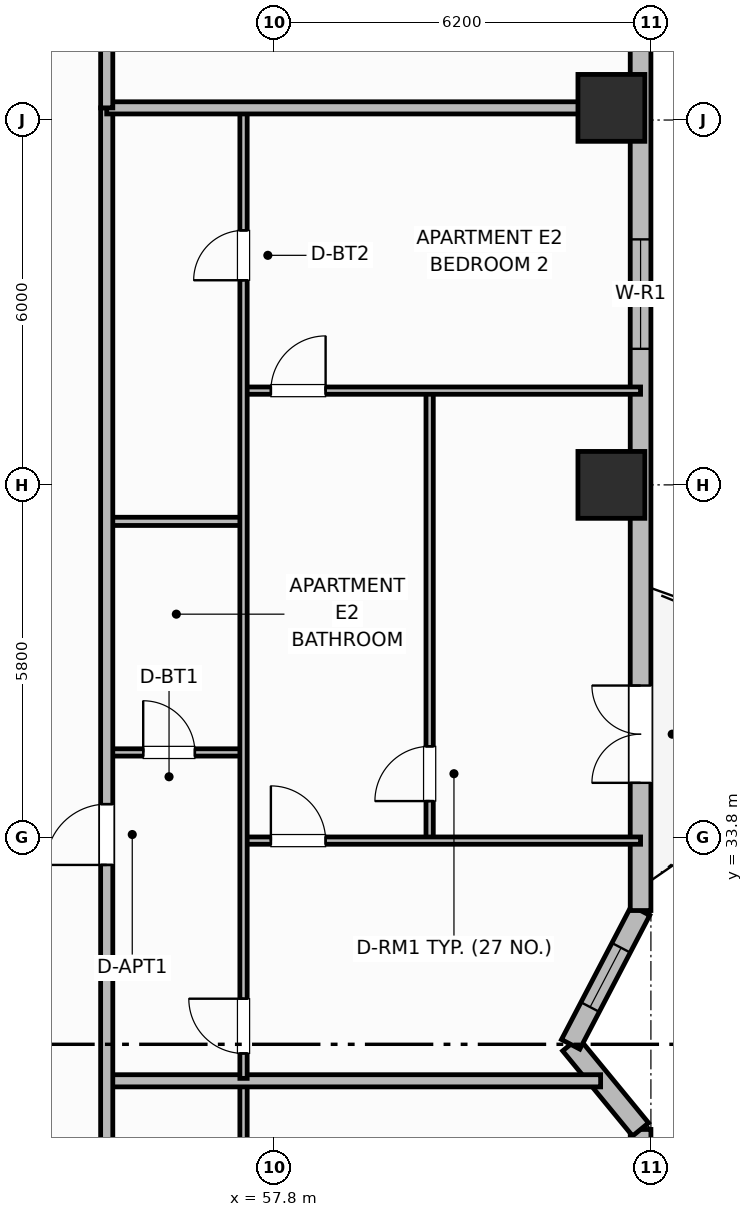
"""IFC4 building model, lengths in metres.
Left out: names, types, materials, properties, quantities, classifications, styles, units other than length and angle.
Written with IfcOpenShell. Run it as: python <this file> out.ifc"""

import sys

from ifc_helpers import new_model, si_unit, direction, frame, frame_2d, origin, origin_2d, place, context, subcontext, project, spatial, rectangle, extrude, element, fill, save


model = new_model("IFC4")
c1 = context("Model", 3, precision=1e-05, world=origin(), true_north=direction((0.0, 1.0)))
c2 = subcontext(c1, "Body", "Model", "MODEL_VIEW")
j1 = project(units=[si_unit("LENGTHUNIT", "METRE"), si_unit("PLANEANGLEUNIT", "RADIAN")], contexts=[c1])
p1 = place(None, origin())
s1 = spatial("IfcSite", under=j1, at=p1, CompositionType="ELEMENT")
p2 = place(p1, origin())
s2 = spatial("IfcBuilding", under=s1, at=p2, CompositionType="ELEMENT")
p3 = place(p2, frame((0.0, 0.0, 132.7)))
s3 = spatial("IfcBuildingStorey", under=s2, at=p3, CompositionType="ELEMENT", Elevation=132.7)
for number, where, z_axis, x_axis in (
    (1, (63.35, 39.6, 0.0), (0.0, 0.0, 1.0), (1.0, 0.0, 0.0)),
    (2, (63.35, 45.8, 0.0), (0.0, 0.0, 1.0), (1.0, 0.0, 0.0)),
):
    element("IfcColumn", number, at=place(p3, frame(where, z_axis=z_axis, x_axis=x_axis)), inside=s3, PredefinedType="COLUMN", context=c2, shape_type="SweptSolid", body=[
        extrude(rectangle(XDim=1.1, YDim=1.1, at=origin_2d()), origin(), (0.0, 0.0, 1.0), 3.7),
    ])
p4 = place(p3, frame((63.83, 27.4, 0.0), z_axis=(0.0, 0.0, 1.0), x_axis=(0.0, 1.0, 0.0)))
e3 = element("IfcWall", 3, at=p4, inside=s3, PredefinedType="SOLIDWALL", context=c2, shape_type="SweptSolid", body=[
    extrude(rectangle(XDim=1.6, YDim=0.34, at=frame_2d((0.8, 0.0))), origin(), (0.0, 0.0, 1.0), 2.66),
])
p5 = place(p3, frame((63.83, 29.0, 0.0), z_axis=(0.0, 0.0, 1.0), x_axis=(-0.634814134075, 0.772664878961, 0.0)))
e4 = element("IfcWall", 4, at=p5, inside=s3, PredefinedType="SOLIDWALL", context=c2, shape_type="SweptSolid", body=[
    extrude(rectangle(XDim=1.812, YDim=0.34, at=frame_2d((0.906, 0.0))), origin(), (0.0, 0.0, 1.0), 2.66),
])
p6 = place(p3, frame((62.68, 30.4, 0.0), z_axis=(0.0, 0.0, 1.0), x_axis=(0.46326825181, 0.88621810344, 0.0)))
e5 = element("IfcWall", 5, at=p6, inside=s3, PredefinedType="SOLIDWALL", context=c2, shape_type="SweptSolid", body=[
    extrude(rectangle(XDim=2.483, YDim=0.34, at=frame_2d((1.241, 0.0))), origin(), (0.0, 0.0, 1.0), 2.66),
])
p7 = place(p6, frame((0.691, 0.0, 0.85)))
e6 = element("IfcOpeningElement", 6, at=p7, cuts=e5, PredefinedType="OPENING", context=c2, shape_type="SweptSolid", body=[
    extrude(rectangle(XDim=1.1, YDim=1.65, at=frame_2d((0.55, 0.825))), frame((0.0, 0.18, 0.0), z_axis=(0.0, -1.0, 0.0), x_axis=(1.0, 0.0, 0.0)), (0.0, 0.0, 1.0), 0.36),
])
p8 = place(p3, frame((63.83, 32.6, 0.0), z_axis=(0.0, 0.0, 1.0), x_axis=(0.0, 1.0, 0.0)))
e7 = element("IfcWall", 7, at=p8, inside=s3, PredefinedType="SOLIDWALL", context=c2, shape_type="SweptSolid", body=[
    extrude(rectangle(XDim=14.8, YDim=0.34, at=frame_2d((7.4, 0.0))), origin(), (0.0, 0.0, 1.0), 2.66),
])
p9 = place(p8, frame((2.1, 0.0, 0.0)))
e8 = element("IfcOpeningElement", 8, at=p9, cuts=e7, PredefinedType="OPENING", context=c2, shape_type="SweptSolid", body=[
    extrude(rectangle(XDim=1.6, YDim=2.1, at=frame_2d((0.8, 1.05))), frame((0.0, 0.18, 0.0), z_axis=(0.0, -1.0, 0.0), x_axis=(1.0, 0.0, 0.0)), (0.0, 0.0, 1.0), 0.36),
])
p10 = place(p8, frame((9.238, 0.0, 0.69)))
e9 = element("IfcOpeningElement", 9, at=p10, cuts=e7, PredefinedType="OPENING", context=c2, shape_type="SweptSolid", body=[
    extrude(rectangle(XDim=1.8, YDim=1.85, at=frame_2d((0.9, 0.925))), frame((0.0, 0.18, 0.0), z_axis=(0.0, -1.0, 0.0), x_axis=(1.0, 0.0, 0.0)), (0.0, 0.0, 1.0), 0.36),
])
p11 = place(p3, frame((57.3, 10.64, 0.0), z_axis=(0.0, 0.0, 1.0), x_axis=(0.0, 1.0, 0.0)))
e10 = element("IfcWall", 10, at=p11, inside=s3, PredefinedType="PARTITIONING", context=c2, shape_type="SweptSolid", body=[
    extrude(rectangle(XDim=19.12, YDim=0.12, at=frame_2d((9.56, 0.0))), origin(), (0.0, 0.0, 1.0), 2.49),
])
p12 = place(p11, frame((0.41, 0.0, 0.0)))
e11 = element("IfcOpeningElement", 11, at=p12, cuts=e10, PredefinedType="OPENING", context=c2, shape_type="SweptSolid", body=[
    extrude(rectangle(XDim=0.9, YDim=2.1, at=frame_2d((0.45, 1.05))), frame((0.0, 0.07, 0.0), z_axis=(0.0, -1.0, 0.0), x_axis=(1.0, 0.0, 0.0)), (0.0, 0.0, 1.0), 0.14),
])
p13 = place(p11, frame((12.105, 0.0, 0.0)))
e12 = element("IfcOpeningElement", 12, at=p13, cuts=e10, PredefinedType="OPENING", context=c2, shape_type="SweptSolid", body=[
    extrude(rectangle(XDim=0.82, YDim=2.08, at=frame_2d((0.41, 1.04))), frame((0.0, 0.07, 0.0), z_axis=(0.0, -1.0, 0.0), x_axis=(1.0, 0.0, 0.0)), (0.0, 0.0, 1.0), 0.14),
])
p14 = place(p3, frame((55.05, 29.8, 0.0), z_axis=(0.0, 0.0, 1.0), x_axis=(1.0, 0.0, 0.0)))
e13 = element("IfcWall", 13, at=p14, inside=s3, PredefinedType="PARTITIONING", context=c2, shape_type="SweptSolid", body=[
    extrude(rectangle(XDim=8.123, YDim=0.2, at=frame_2d((4.062, 0.0))), origin(), (0.0, 0.0, 1.0), 2.49),
])
p15 = place(p3, frame((55.05, 35.2, 0.0), z_axis=(0.0, 0.0, 1.0), x_axis=(1.0, 0.0, 0.0)))
e14 = element("IfcWall", 14, at=p15, inside=s3, PredefinedType="PARTITIONING", context=c2, shape_type="SweptSolid", body=[
    extrude(rectangle(XDim=2.25, YDim=0.12, at=frame_2d((1.125, 0.0))), origin(), (0.0, 0.0, 1.0), 2.49),
])
p16 = place(p15, frame((0.6, 0.0, 0.0)))
e15 = element("IfcOpeningElement", 15, at=p16, cuts=e14, PredefinedType="OPENING", context=c2, shape_type="SweptSolid", body=[
    extrude(rectangle(XDim=0.85, YDim=2.1, at=frame_2d((0.425, 1.05))), frame((0.0, 0.07, 0.0), z_axis=(0.0, -1.0, 0.0), x_axis=(1.0, 0.0, 0.0)), (0.0, 0.0, 1.0), 0.14),
])
p17 = place(p3, frame((55.05, 39.0, 0.0), z_axis=(0.0, 0.0, 1.0), x_axis=(1.0, 0.0, 0.0)))
e16 = element("IfcWall", 16, at=p17, inside=s3, PredefinedType="PARTITIONING", context=c2, shape_type="SweptSolid", body=[
    extrude(rectangle(XDim=2.25, YDim=0.135, at=frame_2d((1.125, 0.0))), origin(), (0.0, 0.0, 1.0), 2.49),
])
p18 = place(p3, frame((60.361, 33.79, 0.0), z_axis=(0.0, 0.0, 1.0), x_axis=(0.0, 1.0, 0.0)))
e17 = element("IfcWall", 17, at=p18, inside=s3, PredefinedType="PARTITIONING", context=c2, shape_type="SweptSolid", body=[
    extrude(rectangle(XDim=7.32, YDim=0.12, at=frame_2d((3.66, 0.0))), origin(), (0.0, 0.0, 1.0), 2.49),
])
p19 = place(p18, frame((0.61, 0.0, 0.0)))
e18 = element("IfcOpeningElement", 18, at=p19, cuts=e17, PredefinedType="OPENING", context=c2, shape_type="SweptSolid", body=[
    extrude(rectangle(XDim=0.9, YDim=2.1, at=frame_2d((0.45, 1.05))), frame((0.0, 0.07, 0.0), z_axis=(0.0, -1.0, 0.0), x_axis=(1.0, 0.0, 0.0)), (0.0, 0.0, 1.0), 0.14),
])
p20 = place(p3, frame((57.3, 33.75, 0.0), z_axis=(0.0, 0.0, 1.0), x_axis=(1.0, 0.0, 0.0)))
e19 = element("IfcWall", 19, at=p20, inside=s3, PredefinedType="PARTITIONING", context=c2, shape_type="SweptSolid", body=[
    extrude(rectangle(XDim=6.53, YDim=0.12, at=frame_2d((3.265, 0.0))), origin(), (0.0, 0.0, 1.0), 2.49),
])
p21 = place(p20, frame((0.45, 0.0, 0.0)))
e20 = element("IfcOpeningElement", 20, at=p21, cuts=e19, PredefinedType="OPENING", context=c2, shape_type="SweptSolid", body=[
    extrude(rectangle(XDim=0.9, YDim=2.1, at=frame_2d((0.45, 1.05))), frame((0.0, 0.07, 0.0), z_axis=(0.0, -1.0, 0.0), x_axis=(1.0, 0.0, 0.0)), (0.0, 0.0, 1.0), 0.14),
])
p22 = place(p3, frame((57.3, 41.15, 0.0), z_axis=(0.0, 0.0, 1.0), x_axis=(1.0, 0.0, 0.0)))
e21 = element("IfcWall", 21, at=p22, inside=s3, PredefinedType="PARTITIONING", context=c2, shape_type="SweptSolid", body=[
    extrude(rectangle(XDim=6.53, YDim=0.12, at=frame_2d((3.265, 0.0))), origin(), (0.0, 0.0, 1.0), 2.49),
])
p23 = place(p22, frame((0.45, 0.0, 0.0)))
e22 = element("IfcOpeningElement", 22, at=p23, cuts=e21, PredefinedType="OPENING", context=c2, shape_type="SweptSolid", body=[
    extrude(rectangle(XDim=0.9, YDim=2.1, at=frame_2d((0.45, 1.05))), frame((0.0, 0.07, 0.0), z_axis=(0.0, -1.0, 0.0), x_axis=(1.0, 0.0, 0.0)), (0.0, 0.0, 1.0), 0.14),
])
p24 = place(p3, frame((57.3, 29.84, 0.0), z_axis=(0.0, 0.0, 1.0), x_axis=(0.0, 1.0, 0.0)))
e23 = element("IfcWall", 23, at=p24, inside=s3, PredefinedType="PARTITIONING", context=c2, shape_type="SweptSolid", body=[
    extrude(rectangle(XDim=15.92, YDim=0.12, at=frame_2d((7.96, 0.0))), origin(), (0.0, 0.0, 1.0), 2.49),
])
p25 = place(p24, frame((0.41, 0.0, 0.0)))
e24 = element("IfcOpeningElement", 24, at=p25, cuts=e23, PredefinedType="OPENING", context=c2, shape_type="SweptSolid", body=[
    extrude(rectangle(XDim=0.9, YDim=2.1, at=frame_2d((0.45, 1.05))), frame((0.0, 0.07, 0.0), z_axis=(0.0, -1.0, 0.0), x_axis=(1.0, 0.0, 0.0)), (0.0, 0.0, 1.0), 0.14),
])
p26 = place(p24, frame((13.125, 0.0, 0.0)))
e25 = element("IfcOpeningElement", 25, at=p26, cuts=e23, PredefinedType="OPENING", context=c2, shape_type="SweptSolid", body=[
    extrude(rectangle(XDim=0.82, YDim=2.08, at=frame_2d((0.41, 1.04))), frame((0.0, 0.07, 0.0), z_axis=(0.0, -1.0, 0.0), x_axis=(1.0, 0.0, 0.0)), (0.0, 0.0, 1.0), 0.14),
])
p27 = place(p3, frame((55.05, 10.6, 0.0), z_axis=(0.0, 0.0, 1.0), x_axis=(0.0, 1.0, 0.0)))
e26 = element("IfcWall", 26, at=p27, inside=s3, PredefinedType="PARTITIONING", context=c2, shape_type="SweptSolid", body=[
    extrude(rectangle(XDim=35.2, YDim=0.2, at=frame_2d((17.6, 0.0))), origin(), (0.0, 0.0, 1.0), 2.49),
])
p28 = place(p27, frame((2.65, 0.0, 0.0)))
e27 = element("IfcOpeningElement", 27, at=p28, cuts=e26, PredefinedType="OPENING", context=c2, shape_type="SweptSolid", body=[
    extrude(rectangle(XDim=1.0, YDim=2.15, at=frame_2d((0.5, 1.075))), frame((0.0, 0.11, 0.0), z_axis=(0.0, -1.0, 0.0), x_axis=(1.0, 0.0, 0.0)), (0.0, 0.0, 1.0), 0.22),
])
p29 = place(p27, frame((22.75, 0.0, 0.0)))
e28 = element("IfcOpeningElement", 28, at=p29, cuts=e26, PredefinedType="OPENING", context=c2, shape_type="SweptSolid", body=[
    extrude(rectangle(XDim=1.0, YDim=2.15, at=frame_2d((0.5, 1.075))), frame((0.0, 0.11, 0.0), z_axis=(0.0, -1.0, 0.0), x_axis=(1.0, 0.0, 0.0)), (0.0, 0.0, 1.0), 0.22),
])
p30 = place(p3, frame((55.05, 45.8, 0.0), z_axis=(0.0, 0.0, 1.0), x_axis=(1.0, 0.0, 0.0)))
e29 = element("IfcWall", 29, at=p30, inside=s3, PredefinedType="PARTITIONING", context=c2, shape_type="SweptSolid", body=[
    extrude(rectangle(XDim=8.36, YDim=0.2, at=frame_2d((4.18, 0.0))), origin(), (0.0, 0.0, 1.0), 2.49),
])
p31 = place(p3, frame((55.05, 45.8, 0.0), z_axis=(0.0, 0.0, 1.0), x_axis=(0.0, 1.0, 0.0)))
e30 = element("IfcWall", 30, at=p31, inside=s3, PredefinedType="PARTITIONING", context=c2, shape_type="SweptSolid", body=[
    extrude(rectangle(XDim=5.63, YDim=0.2, at=frame_2d((2.815, 0.0))), origin(), (0.0, 0.0, 1.0), 2.49),
])
p32 = place(p7, origin())
e31 = element("IfcWindow", 31, at=p32, inside=s3, PartitioningType="SINGLE_PANEL", PredefinedType="WINDOW", context=c2, shape_type="SweptSolid", body=[
    extrude(rectangle(XDim=1.1, YDim=1.65, at=frame_2d((0.55, 0.825))), frame((0.0, 0.03, 0.0), z_axis=(0.0, -1.0, 0.0), x_axis=(1.0, 0.0, 0.0)), (0.0, 0.0, 1.0), 0.06),
])
fill(e6, e31)
p33 = place(p9, origin())
e32 = element("IfcDoor", 32, at=p33, inside=s3, OperationType="DOUBLE_DOOR_SINGLE_SWING", PredefinedType="DOOR", context=c2, shape_type="SweptSolid", body=[
    extrude(rectangle(XDim=1.6, YDim=2.1, at=frame_2d((0.8, 1.05))), frame((0.0, 0.025, 0.0), z_axis=(0.0, -1.0, 0.0), x_axis=(1.0, 0.0, 0.0)), (0.0, 0.0, 1.0), 0.05),
])
fill(e8, e32)
p34 = place(p10, origin())
e33 = element("IfcWindow", 33, at=p34, inside=s3, PartitioningType="SINGLE_PANEL", PredefinedType="WINDOW", context=c2, shape_type="SweptSolid", body=[
    extrude(rectangle(XDim=1.8, YDim=1.85, at=frame_2d((0.9, 0.925))), frame((0.0, 0.03, 0.0), z_axis=(0.0, -1.0, 0.0), x_axis=(1.0, 0.0, 0.0)), (0.0, 0.0, 1.0), 0.06),
])
fill(e9, e33)
p35 = place(p16, origin())
e34 = element("IfcDoor", 34, at=p35, inside=s3, OperationType="SINGLE_SWING_LEFT", PredefinedType="DOOR", context=c2, shape_type="SweptSolid", body=[
    extrude(rectangle(XDim=0.85, YDim=2.1, at=frame_2d((0.425, 1.05))), frame((0.0, 0.025, 0.0), z_axis=(0.0, -1.0, 0.0), x_axis=(1.0, 0.0, 0.0)), (0.0, 0.0, 1.0), 0.05),
])
fill(e15, e34)
p36 = place(p19, origin())
e35 = element("IfcDoor", 35, at=p36, inside=s3, OperationType="SINGLE_SWING_LEFT", PredefinedType="DOOR", context=c2, shape_type="SweptSolid", body=[
    extrude(rectangle(XDim=0.9, YDim=2.1, at=frame_2d((0.45, 1.05))), frame((0.0, 0.025, 0.0), z_axis=(0.0, -1.0, 0.0), x_axis=(1.0, 0.0, 0.0)), (0.0, 0.0, 1.0), 0.05),
])
fill(e18, e35)
p37 = place(p21, origin())
e36 = element("IfcDoor", 36, at=p37, inside=s3, OperationType="SINGLE_SWING_LEFT", PredefinedType="DOOR", context=c2, shape_type="SweptSolid", body=[
    extrude(rectangle(XDim=0.9, YDim=2.1, at=frame_2d((0.45, 1.05))), frame((0.0, 0.025, 0.0), z_axis=(0.0, -1.0, 0.0), x_axis=(1.0, 0.0, 0.0)), (0.0, 0.0, 1.0), 0.05),
])
fill(e20, e36)
p38 = place(p23, origin())
e37 = element("IfcDoor", 37, at=p38, inside=s3, OperationType="SINGLE_SWING_RIGHT", PredefinedType="DOOR", context=c2, shape_type="SweptSolid", body=[
    extrude(rectangle(XDim=0.9, YDim=2.1, at=frame_2d((0.45, 1.05))), frame((0.0, 0.025, 0.0), z_axis=(0.0, -1.0, 0.0), x_axis=(1.0, 0.0, 0.0)), (0.0, 0.0, 1.0), 0.05),
])
fill(e22, e37)
p39 = place(p25, origin())
e38 = element("IfcDoor", 38, at=p39, inside=s3, OperationType="SINGLE_SWING_RIGHT", PredefinedType="DOOR", context=c2, shape_type="SweptSolid", body=[
    extrude(rectangle(XDim=0.9, YDim=2.1, at=frame_2d((0.45, 1.05))), frame((0.0, 0.025, 0.0), z_axis=(0.0, -1.0, 0.0), x_axis=(1.0, 0.0, 0.0)), (0.0, 0.0, 1.0), 0.05),
])
fill(e24, e38)
p40 = place(p26, origin())
e39 = element("IfcDoor", 39, at=p40, inside=s3, OperationType="SINGLE_SWING_LEFT", PredefinedType="DOOR", context=c2, shape_type="SweptSolid", body=[
    extrude(rectangle(XDim=0.82, YDim=2.08, at=frame_2d((0.41, 1.04))), frame((0.0, 0.025, 0.0), z_axis=(0.0, -1.0, 0.0), x_axis=(1.0, 0.0, 0.0)), (0.0, 0.0, 1.0), 0.05),
])
fill(e25, e39)
p41 = place(p29, origin())
e40 = element("IfcDoor", 40, at=p41, inside=s3, OperationType="SINGLE_SWING_LEFT", PredefinedType="DOOR", context=c2, shape_type="SweptSolid", body=[
    extrude(rectangle(XDim=1.0, YDim=2.15, at=frame_2d((0.5, 1.075))), frame((0.0, 0.025, 0.0), z_axis=(0.0, -1.0, 0.0), x_axis=(1.0, 0.0, 0.0)), (0.0, 0.0, 1.0), 0.05),
])
fill(e28, e40)
save(model, sys.argv[1])
